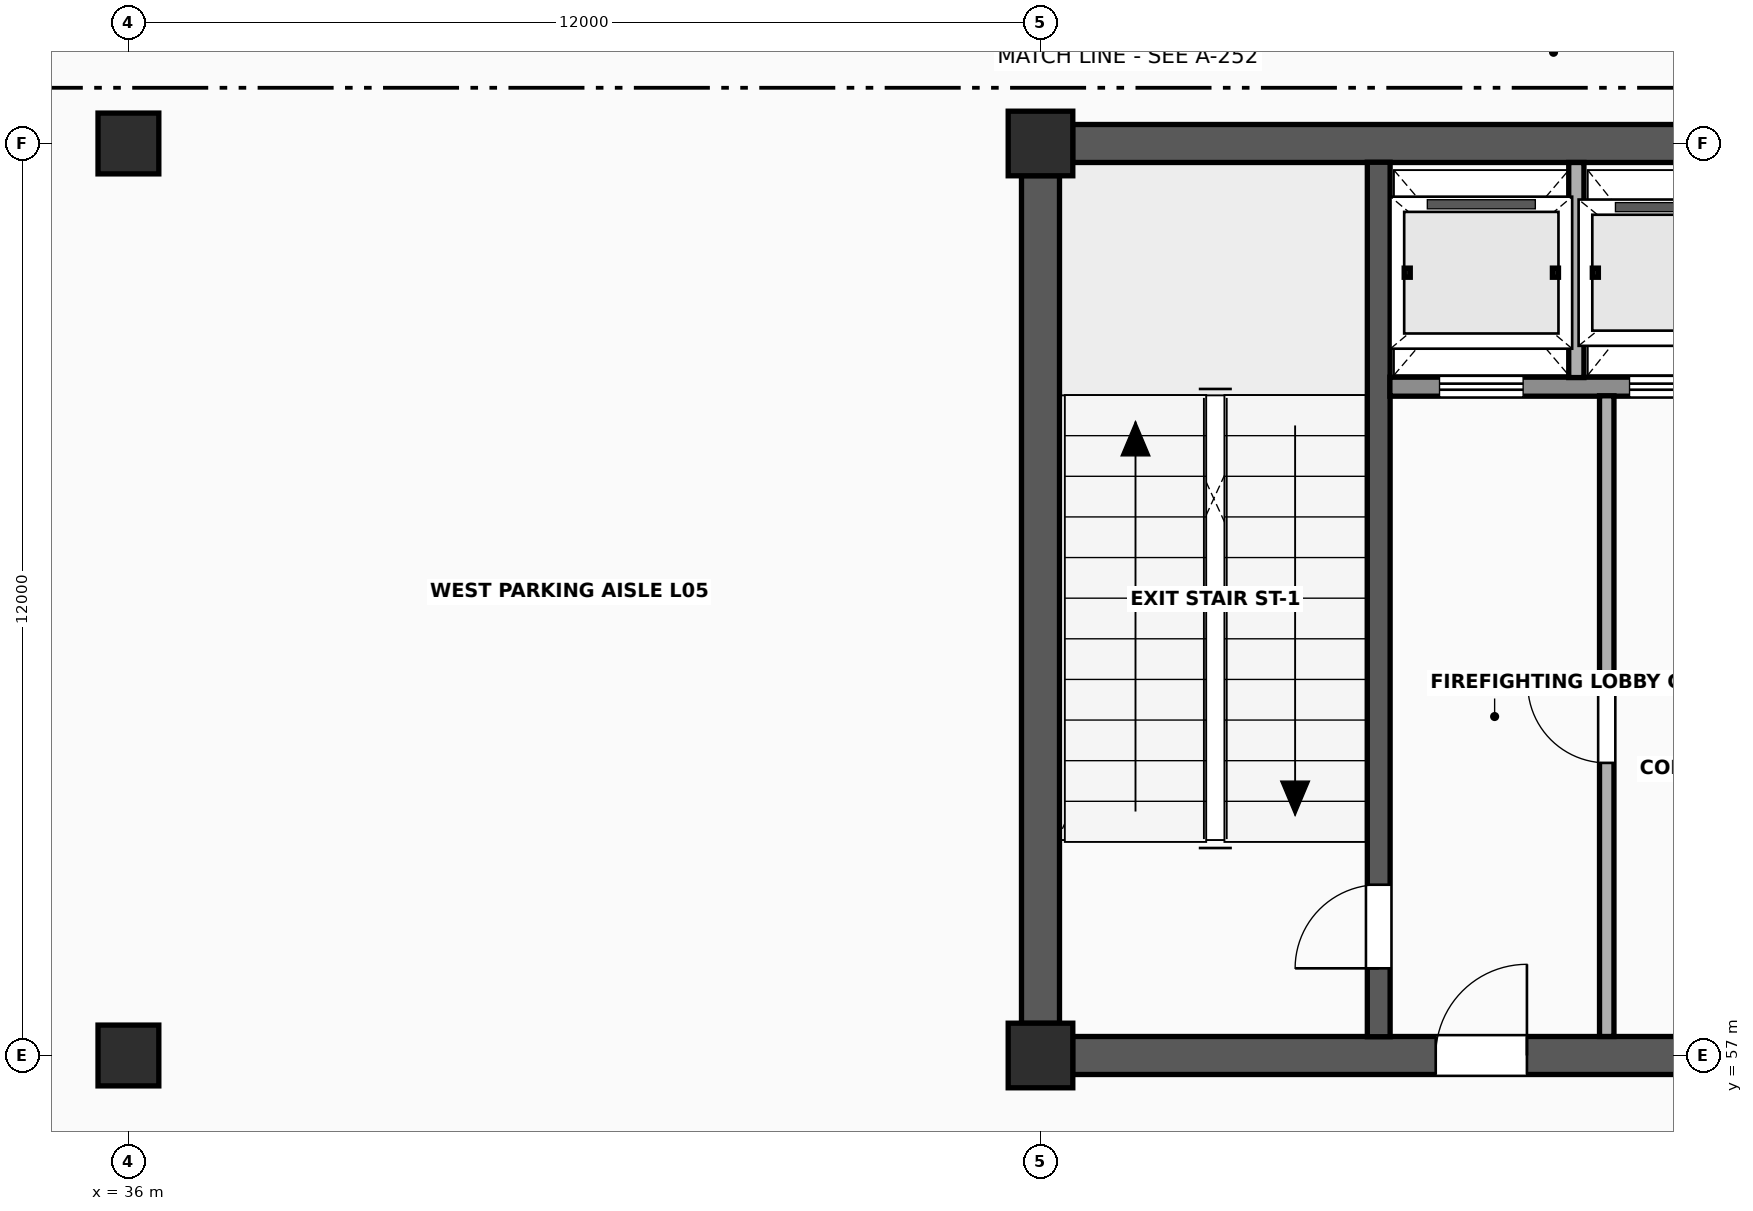
"""IFC4 building model, lengths in metres.
Left out: names, types, materials, properties, quantities, classifications, styles, units other than length and angle.
Written with IfcOpenShell. Run it as: python <this file> out.ifc"""

import sys

from ifc_helpers import new_model, si_unit, direction, frame, frame_2d, origin, origin_2d, place, context, subcontext, project, spatial, rectangle, extrude, element, fill, save


model = new_model("IFC4")
c1 = context("Model", 3, precision=1e-05, world=origin(), true_north=direction((0.0, 1.0)))
c2 = subcontext(c1, "Body", "Model", "MODEL_VIEW")
j1 = project(units=[si_unit("LENGTHUNIT", "METRE"), si_unit("PLANEANGLEUNIT", "RADIAN")], contexts=[c1])
p1 = place(None, origin())
s1 = spatial("IfcSite", under=j1, at=p1, CompositionType="ELEMENT")
p2 = place(p1, origin())
s2 = spatial("IfcBuilding", under=s1, at=p2, CompositionType="ELEMENT")
p3 = place(p2, frame((0.0, 0.0, 21.0)))
s3 = spatial("IfcBuildingStorey", under=s2, at=p3, CompositionType="ELEMENT", Elevation=21.0)
for number, where, z_axis, x_axis in (
    (1, (36.0, 57.0, 0.0), (0.0, 0.0, 1.0), (1.0, 0.0, 0.0)),
    (2, (36.0, 69.0, 0.0), (0.0, 0.0, 1.0), (1.0, 0.0, 0.0)),
):
    element("IfcColumn", number, at=place(p3, frame(where, z_axis=z_axis, x_axis=x_axis)), inside=s3, PredefinedType="COLUMN", context=c2, shape_type="SweptSolid", body=[
        extrude(rectangle(XDim=0.8, YDim=0.8, at=origin_2d()), origin(), (0.0, 0.0, 1.0), 3.8),
    ])
for number, where, z_axis, x_axis in (
    (3, (48.0, 57.0, 0.0), (0.0, 0.0, 1.0), (1.0, 0.0, 0.0)),
    (4, (48.0, 69.0, 0.0), (0.0, 0.0, 1.0), (1.0, 0.0, 0.0)),
):
    element("IfcColumn", number, at=place(p3, frame(where, z_axis=z_axis, x_axis=x_axis)), inside=s3, PredefinedType="COLUMN", context=c2, shape_type="SweptSolid", body=[
        extrude(rectangle(XDim=0.85, YDim=0.85, at=origin_2d()), origin(), (0.0, 0.0, 1.0), 3.8),
    ])
p4 = place(p3, frame((48.422, 57.0, 0.0), z_axis=(0.0, 0.0, 1.0), x_axis=(1.0, 0.0, 0.0)))
e5 = element("IfcWall", 5, at=p4, inside=s3, PredefinedType="SHEAR", context=c2, shape_type="SweptSolid", body=[
    extrude(rectangle(XDim=11.156, YDim=0.5, at=frame_2d((5.578, 0.0))), origin(), (0.0, 0.0, 1.0), 3.638),
])
p5 = place(p4, frame((4.778, 0.0, 0.0)))
e6 = element("IfcOpeningElement", 6, at=p5, cuts=e5, PredefinedType="OPENING", context=c2, shape_type="SweptSolid", body=[
    extrude(rectangle(XDim=1.2, YDim=2.2, at=frame_2d((0.6, 1.1))), frame((0.0, 0.265, 0.0), z_axis=(0.0, -1.0, 0.0), x_axis=(1.0, 0.0, 0.0)), (0.0, 0.0, 1.0), 0.53),
])
p6 = place(p4, frame((8.478, 0.0, 0.0)))
e7 = element("IfcOpeningElement", 7, at=p6, cuts=e5, PredefinedType="OPENING", context=c2, shape_type="SweptSolid", body=[
    extrude(rectangle(XDim=1.5, YDim=2.25, at=frame_2d((0.75, 1.125))), frame((0.0, 0.265, 0.0), z_axis=(0.0, -1.0, 0.0), x_axis=(1.0, 0.0, 0.0)), (0.0, 0.0, 1.0), 0.53),
])
for number, where, z_axis, x_axis in (
    (8, (48.422, 69.0, 0.0), (0.0, 0.0, 1.0), (1.0, 0.0, 0.0)),
    (9, (48.0, 57.422, 0.0), (0.0, 0.0, 1.0), (0.0, 1.0, 0.0)),
):
    element("IfcWall", number, at=place(p3, frame(where, z_axis=z_axis, x_axis=x_axis)), inside=s3, PredefinedType="SHEAR", context=c2, shape_type="SweptSolid", body=[
        extrude(rectangle(XDim=11.156, YDim=0.5, at=frame_2d((5.578, 0.0))), origin(), (0.0, 0.0, 1.0), 3.638),
    ])
p7 = place(p3, frame((52.45, 57.247, 0.0), z_axis=(0.0, 0.0, 1.0), x_axis=(0.0, 1.0, 0.0)))
e10 = element("IfcWall", 10, at=p7, inside=s3, PredefinedType="SHEAR", context=c2, shape_type="SweptSolid", body=[
    extrude(rectangle(XDim=11.506, YDim=0.3, at=frame_2d((5.753, 0.0))), origin(), (0.0, 0.0, 1.0), 3.638),
])
p8 = place(p7, frame((0.9, 0.0, 0.0)))
e11 = element("IfcOpeningElement", 11, at=p8, cuts=e10, PredefinedType="OPENING", context=c2, shape_type="SweptSolid", body=[
    extrude(rectangle(XDim=1.1, YDim=2.2, at=frame_2d((0.55, 1.1))), frame((0.0, 0.165, 0.0), z_axis=(0.0, -1.0, 0.0), x_axis=(1.0, 0.0, 0.0)), (0.0, 0.0, 1.0), 0.33),
])
p9 = place(p3, frame((52.597, 65.8, 0.0), z_axis=(0.0, 0.0, 1.0), x_axis=(1.0, 0.0, 0.0)))
e12 = element("IfcWall", 12, at=p9, inside=s3, PredefinedType="SOLIDWALL", context=c2, shape_type="SweptSolid", body=[
    extrude(rectangle(XDim=7.156, YDim=0.25, at=frame_2d((3.578, 0.0))), origin(), (0.0, 0.0, 1.0), 3.638),
])
p10 = place(p9, frame((0.653, 0.0, 0.0)))
e13 = element("IfcOpeningElement", 13, at=p10, cuts=e12, PredefinedType="OPENING", context=c2, shape_type="SweptSolid", body=[
    extrude(rectangle(XDim=1.1, YDim=2.24, at=frame_2d((0.55, 1.12))), frame((0.0, 0.14, 0.0), z_axis=(0.0, -1.0, 0.0), x_axis=(1.0, 0.0, 0.0)), (0.0, 0.0, 1.0), 0.28),
])
p11 = place(p9, frame((3.153, 0.0, 0.0)))
e14 = element("IfcOpeningElement", 14, at=p11, cuts=e12, PredefinedType="OPENING", context=c2, shape_type="SweptSolid", body=[
    extrude(rectangle(XDim=1.05, YDim=2.2, at=frame_2d((0.525, 1.1))), frame((0.0, 0.14, 0.0), z_axis=(0.0, -1.0, 0.0), x_axis=(1.0, 0.0, 0.0)), (0.0, 0.0, 1.0), 0.28),
])
p12 = place(p9, frame((5.528, 0.0, 0.0)))
e15 = element("IfcOpeningElement", 15, at=p12, cuts=e12, PredefinedType="OPENING", context=c2, shape_type="SweptSolid", body=[
    extrude(rectangle(XDim=1.05, YDim=2.2, at=frame_2d((0.525, 1.1))), frame((0.0, 0.14, 0.0), z_axis=(0.0, -1.0, 0.0), x_axis=(1.0, 0.0, 0.0)), (0.0, 0.0, 1.0), 0.28),
])
p13 = place(p3, frame((55.05, 65.92, 0.0), z_axis=(0.0, 0.0, 1.0), x_axis=(0.0, 1.0, 0.0)))
e16 = element("IfcWall", 16, at=p13, inside=s3, PredefinedType="SOLIDWALL", context=c2, shape_type="SweptSolid", body=[
    extrude(rectangle(XDim=2.83, YDim=0.2, at=frame_2d((1.415, 0.0))), origin(), (0.0, 0.0, 1.0), 3.628),
])
p14 = place(p3, frame((55.45, 57.25, 0.0), z_axis=(0.0, 0.0, 1.0), x_axis=(0.0, 1.0, 0.0)))
e17 = element("IfcWall", 17, at=p14, inside=s3, PredefinedType="SOLIDWALL", context=c2, shape_type="SweptSolid", body=[
    extrude(rectangle(XDim=8.43, YDim=0.19, at=frame_2d((4.215, 0.0))), origin(), (0.0, 0.0, 1.0), 3.628),
])
p15 = place(p14, frame((3.6, 0.0, 0.0)))
e18 = element("IfcOpeningElement", 18, at=p15, cuts=e17, PredefinedType="OPENING", context=c2, shape_type="SweptSolid", body=[
    extrude(rectangle(XDim=1.04, YDim=2.18, at=frame_2d((0.52, 1.09))), frame((0.0, 0.11, 0.0), z_axis=(0.0, -1.0, 0.0), x_axis=(1.0, 0.0, 0.0)), (0.0, 0.0, 1.0), 0.22),
])
p16 = place(p8, origin())
e19 = element("IfcDoor", 19, at=p16, inside=s3, OperationType="SINGLE_SWING_LEFT", PredefinedType="DOOR", context=c2, shape_type="SweptSolid", body=[
    extrude(rectangle(XDim=1.1, YDim=2.2, at=frame_2d((0.55, 1.1))), frame((0.0, 0.025, 0.0), z_axis=(0.0, -1.0, 0.0), x_axis=(1.0, 0.0, 0.0)), (0.0, 0.0, 1.0), 0.05),
])
fill(e11, e19)
p17 = place(p15, origin())
e20 = element("IfcDoor", 20, at=p17, inside=s3, OperationType="SINGLE_SWING_RIGHT", PredefinedType="DOOR", context=c2, shape_type="SweptSolid", body=[
    extrude(rectangle(XDim=1.04, YDim=2.18, at=frame_2d((0.52, 1.09))), frame((0.0, 0.025, 0.0), z_axis=(0.0, -1.0, 0.0), x_axis=(1.0, 0.0, 0.0)), (0.0, 0.0, 1.0), 0.05),
])
fill(e18, e20)
p18 = place(p5, origin())
e21 = element("IfcDoor", 21, at=p18, inside=s3, OperationType="SINGLE_SWING_RIGHT", PredefinedType="DOOR", context=c2, shape_type="SweptSolid", body=[
    extrude(rectangle(XDim=1.2, YDim=2.2, at=frame_2d((0.6, 1.1))), frame((0.0, 0.025, 0.0), z_axis=(0.0, -1.0, 0.0), x_axis=(1.0, 0.0, 0.0)), (0.0, 0.0, 1.0), 0.05),
])
fill(e6, e21)
p19 = place(p10, origin())
e22 = element("IfcDoor", 22, at=p19, inside=s3, OperationType="SLIDING_TO_LEFT", PredefinedType="USERDEFINED", context=c2, shape_type="SweptSolid", body=[
    extrude(rectangle(XDim=1.1, YDim=2.24, at=frame_2d((0.55, 1.12))), frame((0.0, 0.025, 0.0), z_axis=(0.0, -1.0, 0.0), x_axis=(1.0, 0.0, 0.0)), (0.0, 0.0, 1.0), 0.05),
])
fill(e13, e22)
p20 = place(p11, origin())
e23 = element("IfcDoor", 23, at=p20, inside=s3, OperationType="SLIDING_TO_LEFT", PredefinedType="USERDEFINED", context=c2, shape_type="SweptSolid", body=[
    extrude(rectangle(XDim=1.05, YDim=2.2, at=frame_2d((0.525, 1.1))), frame((0.0, 0.025, 0.0), z_axis=(0.0, -1.0, 0.0), x_axis=(1.0, 0.0, 0.0)), (0.0, 0.0, 1.0), 0.05),
])
fill(e14, e23)
save(model, sys.argv[1])
